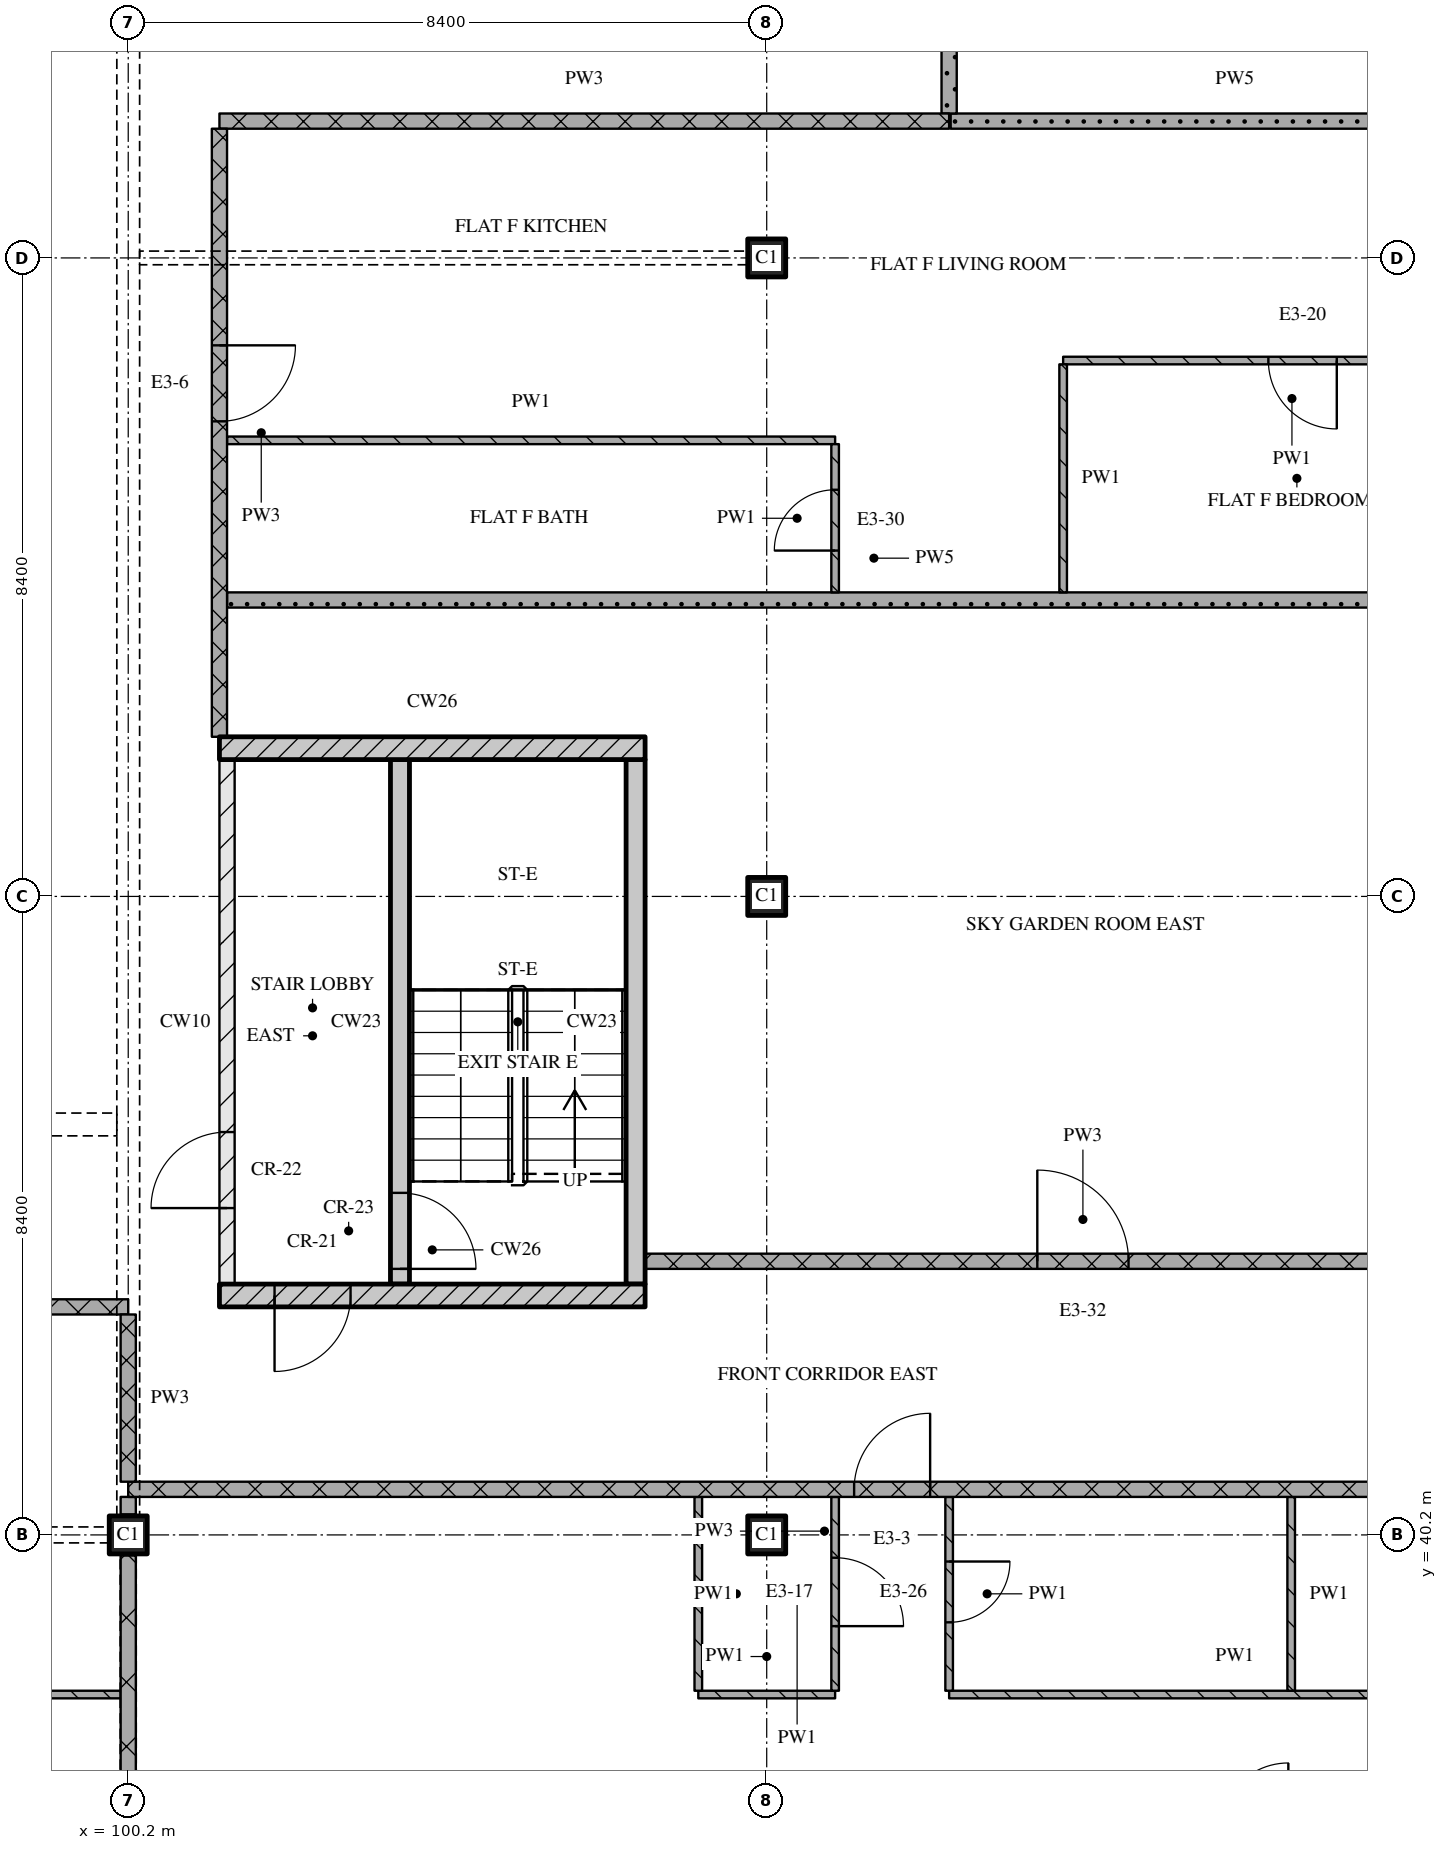
"""IFC4 building model, lengths in metres.
Left out: names, types, materials, properties, quantities, classifications, styles, units other than length and angle.
Written with IfcOpenShell. Run it as: python <this file> out.ifc"""

import sys

from ifc_helpers import new_model, si_unit, direction, frame, frame_2d, origin, origin_2d, place, context, subcontext, project, spatial, rectangle, extrude, element, fill, save


model = new_model("IFC4")
c1 = context("Model", 3, precision=1e-05, world=origin(), true_north=direction((0.0, 1.0)))
c2 = subcontext(c1, "Body", "Model", "MODEL_VIEW")
j1 = project(units=[si_unit("LENGTHUNIT", "METRE"), si_unit("PLANEANGLEUNIT", "RADIAN")], contexts=[c1])
p1 = place(None, origin())
s1 = spatial("IfcSite", under=j1, at=p1, CompositionType="ELEMENT")
p2 = place(p1, origin())
s2 = spatial("IfcBuilding", under=s1, at=p2, CompositionType="ELEMENT")
p3 = place(p2, frame((0.0, 0.0, 274.35)))
s3 = spatial("IfcBuildingStorey", under=s2, at=p3, CompositionType="ELEMENT", Elevation=274.35)
for number, where, z_axis, x_axis in (
    (1, (100.2, 40.2, 0.0), (0.0, 0.0, 1.0), (1.0, 0.0, 0.0)),
    (2, (108.6, 40.2, 0.0), (0.0, 0.0, 1.0), (1.0, 0.0, 0.0)),
    (3, (108.6, 48.6, 0.0), (0.0, 0.0, 1.0), (1.0, 0.0, 0.0)),
    (4, (108.6, 57.0, 0.0), (0.0, 0.0, 1.0), (1.0, 0.0, 0.0)),
):
    element("IfcColumn", number, at=place(p3, frame(where, z_axis=z_axis, x_axis=x_axis)), inside=s3, PredefinedType="COLUMN", context=c2, shape_type="SweptSolid", body=[
        extrude(rectangle(XDim=0.5, YDim=0.5, at=origin_2d()), origin(), (0.0, 0.0, 1.0), 3.6),
    ])
p4 = place(p3, frame((101.4, 43.35, 0.0), z_axis=(0.0, 0.0, 1.0), x_axis=(1.0, 0.0, 0.0)))
e5 = element("IfcWall", 5, at=p4, inside=s3, PredefinedType="SOLIDWALL", context=c2, shape_type="SweptSolid", body=[
    extrude(rectangle(XDim=5.6, YDim=0.3, at=frame_2d((2.8, 0.0))), origin(), (0.0, 0.0, 1.0), 3.32),
])
p5 = place(p4, frame((0.725, 0.0, 0.0)))
e6 = element("IfcOpeningElement", 6, at=p5, cuts=e5, PredefinedType="OPENING", context=c2, shape_type="SweptSolid", body=[
    extrude(rectangle(XDim=1.0, YDim=2.1, at=frame_2d((0.5, 1.05))), frame((0.0, 0.16, 0.0), z_axis=(0.0, -1.0, 0.0), x_axis=(1.0, 0.0, 0.0)), (0.0, 0.0, 1.0), 0.32),
])
p6 = place(p3, frame((101.5, 43.5, 0.0), z_axis=(0.0, 0.0, 1.0), x_axis=(0.0, 1.0, 0.0)))
e7 = element("IfcWall", 7, at=p6, inside=s3, PredefinedType="PARTITIONING", context=c2, shape_type="SweptSolid", body=[
    extrude(rectangle(XDim=6.9, YDim=0.2, at=frame_2d((3.45, 0.0))), origin(), (0.0, 0.0, 1.0), 3.32),
])
p7 = place(p6, frame((1.0, 0.0, 0.0)))
e8 = element("IfcOpeningElement", 8, at=p7, cuts=e7, PredefinedType="OPENING", context=c2, shape_type="SweptSolid", body=[
    extrude(rectangle(XDim=1.0, YDim=2.1, at=frame_2d((0.5, 1.05))), frame((0.0, 0.11, 0.0), z_axis=(0.0, -1.0, 0.0), x_axis=(1.0, 0.0, 0.0)), (0.0, 0.0, 1.0), 0.22),
])
p8 = place(p3, frame((103.775, 43.5, 0.0), z_axis=(0.0, 0.0, 1.0), x_axis=(0.0, 1.0, 0.0)))
e9 = element("IfcWall", 9, at=p8, inside=s3, PredefinedType="SOLIDWALL", context=c2, shape_type="SweptSolid", body=[
    extrude(rectangle(XDim=6.9, YDim=0.25, at=frame_2d((3.45, 0.0))), origin(), (0.0, 0.0, 1.0), 3.32),
])
p9 = place(p8, frame((0.2, 0.0, 0.0)))
e10 = element("IfcOpeningElement", 10, at=p9, cuts=e9, PredefinedType="OPENING", context=c2, shape_type="SweptSolid", body=[
    extrude(rectangle(XDim=1.0, YDim=2.1, at=frame_2d((0.5, 1.05))), frame((0.0, 0.135, 0.0), z_axis=(0.0, -1.0, 0.0), x_axis=(1.0, 0.0, 0.0)), (0.0, 0.0, 1.0), 0.27),
])
p10 = place(p3, frame((106.875, 43.5, 0.0), z_axis=(0.0, 0.0, 1.0), x_axis=(0.0, 1.0, 0.0)))
e11 = element("IfcWall", 11, at=p10, inside=s3, PredefinedType="SOLIDWALL", context=c2, shape_type="SweptSolid", body=[
    extrude(rectangle(XDim=6.9, YDim=0.25, at=frame_2d((3.45, 0.0))), origin(), (0.0, 0.0, 1.0), 3.32),
])
p11 = place(p3, frame((101.4, 50.55, 0.0), z_axis=(0.0, 0.0, 1.0), x_axis=(1.0, 0.0, 0.0)))
e12 = element("IfcWall", 12, at=p11, inside=s3, PredefinedType="SOLIDWALL", context=c2, shape_type="SweptSolid", body=[
    extrude(rectangle(XDim=5.6, YDim=0.3, at=frame_2d((2.8, 0.0))), origin(), (0.0, 0.0, 1.0), 3.32),
])
p12 = place(p3, frame((90.6, 38.1, 0.0), z_axis=(0.0, 0.0, 1.0), x_axis=(1.0, 0.0, 0.0)))
e13 = element("IfcWall", 13, at=p12, inside=s3, PredefinedType="PARTITIONING", context=c2, shape_type="SweptSolid", body=[
    extrude(rectangle(XDim=9.5, YDim=0.1, at=frame_2d((4.75, 0.0))), origin(), (0.0, 0.0, 1.0), 3.32),
])
p13 = place(p12, frame((4.35, 0.0, 0.0)))
e14 = element("IfcOpeningElement", 14, at=p13, cuts=e13, PredefinedType="OPENING", context=c2, shape_type="SweptSolid", body=[
    extrude(rectangle(XDim=0.9, YDim=2.1, at=frame_2d((0.45, 1.05))), frame((0.0, 0.06, 0.0), z_axis=(0.0, -1.0, 0.0), x_axis=(1.0, 0.0, 0.0)), (0.0, 0.0, 1.0), 0.12),
])
p14 = place(p3, frame((107.7, 38.1, 0.0), z_axis=(0.0, 0.0, 1.0), x_axis=(1.0, 0.0, 0.0)))
e15 = element("IfcWall", 15, at=p14, inside=s3, PredefinedType="PARTITIONING", context=c2, shape_type="SweptSolid", body=[
    extrude(rectangle(XDim=1.8, YDim=0.1, at=frame_2d((0.9, 0.0))), origin(), (0.0, 0.0, 1.0), 3.32),
])
p15 = place(p3, frame((111.0, 38.1, 0.0), z_axis=(0.0, 0.0, 1.0), x_axis=(1.0, 0.0, 0.0)))
e16 = element("IfcWall", 16, at=p15, inside=s3, PredefinedType="PARTITIONING", context=c2, shape_type="SweptSolid", body=[
    extrude(rectangle(XDim=7.52, YDim=0.1, at=frame_2d((3.76, 0.0))), origin(), (0.0, 0.0, 1.0), 3.32),
])
p16 = place(p15, frame((5.75, 0.0, 0.0)))
e17 = element("IfcOpeningElement", 17, at=p16, cuts=e16, PredefinedType="OPENING", context=c2, shape_type="SweptSolid", body=[
    extrude(rectangle(XDim=0.8, YDim=2.1, at=frame_2d((0.4, 1.05))), frame((0.0, 0.06, 0.0), z_axis=(0.0, -1.0, 0.0), x_axis=(1.0, 0.0, 0.0)), (0.0, 0.0, 1.0), 0.12),
])
p17 = place(p3, frame((118.52, 40.8, 0.0), z_axis=(0.0, 0.0, 1.0), x_axis=(-1.0, 0.0, 0.0)))
e18 = element("IfcWall", 18, at=p17, inside=s3, PredefinedType="PARTITIONING", context=c2, shape_type="SweptSolid", body=[
    extrude(rectangle(XDim=18.32, YDim=0.2, at=frame_2d((9.16, 0.0))), origin(), (0.0, 0.0, 1.0), 3.32),
])
p18 = place(p17, frame((7.77, 0.0, 0.0)))
e19 = element("IfcOpeningElement", 19, at=p18, cuts=e18, PredefinedType="OPENING", context=c2, shape_type="SweptSolid", body=[
    extrude(rectangle(XDim=1.0, YDim=2.1, at=frame_2d((0.5, 1.05))), frame((0.0, 0.11, 0.0), z_axis=(0.0, -1.0, 0.0), x_axis=(1.0, 0.0, 0.0)), (0.0, 0.0, 1.0), 0.22),
])
p19 = place(p3, frame((100.2, 43.2, 0.0), z_axis=(0.0, 0.0, 1.0), x_axis=(-1.0, 0.0, 0.0)))
e20 = element("IfcWall", 20, at=p19, inside=s3, PredefinedType="PARTITIONING", context=c2, shape_type="SweptSolid", body=[
    extrude(rectangle(XDim=25.2, YDim=0.2, at=frame_2d((12.6, 0.0))), origin(), (0.0, 0.0, 1.0), 3.32),
])
p20 = place(p19, frame((17.35, 0.0, 0.0)))
e21 = element("IfcOpeningElement", 21, at=p20, cuts=e20, PredefinedType="OPENING", context=c2, shape_type="SweptSolid", body=[
    extrude(rectangle(XDim=1.0, YDim=2.1, at=frame_2d((0.5, 1.05))), frame((0.0, 0.11, 0.0), z_axis=(0.0, -1.0, 0.0), x_axis=(1.0, 0.0, 0.0)), (0.0, 0.0, 1.0), 0.22),
])
p21 = place(p3, frame((107.0, 43.8, 0.0), z_axis=(0.0, 0.0, 1.0), x_axis=(1.0, 0.0, 0.0)))
e22 = element("IfcWall", 22, at=p21, inside=s3, PredefinedType="PARTITIONING", context=c2, shape_type="SweptSolid", body=[
    extrude(rectangle(XDim=11.52, YDim=0.2, at=frame_2d((5.76, 0.0))), origin(), (0.0, 0.0, 1.0), 3.32),
])
p22 = place(p21, frame((5.16, 0.0, 0.0)))
e23 = element("IfcOpeningElement", 23, at=p22, cuts=e22, PredefinedType="OPENING", context=c2, shape_type="SweptSolid", body=[
    extrude(rectangle(XDim=1.2, YDim=2.1, at=frame_2d((0.6, 1.05))), frame((0.0, 0.11, 0.0), z_axis=(0.0, -1.0, 0.0), x_axis=(1.0, 0.0, 0.0)), (0.0, 0.0, 1.0), 0.22),
])
p23 = place(p3, frame((101.5, 52.5, 0.0), z_axis=(0.0, 0.0, 1.0), x_axis=(1.0, 0.0, 0.0)))
e24 = element("IfcWall", 24, at=p23, inside=s3, PredefinedType="PARTITIONING", context=c2, shape_type="SweptSolid", body=[
    extrude(rectangle(XDim=17.02, YDim=0.2, at=frame_2d((8.51, 0.0))), origin(), (0.0, 0.0, 1.0), 3.32),
])
p24 = place(p3, frame((101.5, 54.6, 0.0), z_axis=(0.0, 0.0, 1.0), x_axis=(1.0, 0.0, 0.0)))
e25 = element("IfcWall", 25, at=p24, inside=s3, PredefinedType="PARTITIONING", context=c2, shape_type="SweptSolid", body=[
    extrude(rectangle(XDim=8.0, YDim=0.1, at=frame_2d((4.0, 0.0))), origin(), (0.0, 0.0, 1.0), 3.32),
])
p25 = place(p3, frame((118.52, 55.65, 0.0), z_axis=(0.0, 0.0, 1.0), x_axis=(-1.0, 0.0, 0.0)))
e26 = element("IfcWall", 26, at=p25, inside=s3, PredefinedType="PARTITIONING", context=c2, shape_type="SweptSolid", body=[
    extrude(rectangle(XDim=6.02, YDim=0.1, at=frame_2d((3.01, 0.0))), origin(), (0.0, 0.0, 1.0), 3.32),
])
p26 = place(p25, frame((2.42, 0.0, 0.0)))
e27 = element("IfcOpeningElement", 27, at=p26, cuts=e26, PredefinedType="OPENING", context=c2, shape_type="SweptSolid", body=[
    extrude(rectangle(XDim=0.9, YDim=2.1, at=frame_2d((0.45, 1.05))), frame((0.0, 0.06, 0.0), z_axis=(0.0, -1.0, 0.0), x_axis=(1.0, 0.0, 0.0)), (0.0, 0.0, 1.0), 0.12),
])
p27 = place(p3, frame((101.4, 58.8, 0.0), z_axis=(0.0, 0.0, 1.0), x_axis=(1.0, 0.0, 0.0)))
e28 = element("IfcWall", 28, at=p27, inside=s3, PredefinedType="PARTITIONING", context=c2, shape_type="SweptSolid", body=[
    extrude(rectangle(XDim=9.6, YDim=0.2, at=frame_2d((4.8, 0.0))), origin(), (0.0, 0.0, 1.0), 3.32),
])
p28 = place(p3, frame((111.02, 58.8, 0.0), z_axis=(0.0, 0.0, 1.0), x_axis=(1.0, 0.0, 0.0)))
e29 = element("IfcWall", 29, at=p28, inside=s3, PredefinedType="PARTITIONING", context=c2, shape_type="SweptSolid", body=[
    extrude(rectangle(XDim=7.48, YDim=0.2, at=frame_2d((3.74, 0.0))), origin(), (0.0, 0.0, 1.0), 3.32),
])
p29 = place(p3, frame((100.2, 43.1, 0.0), z_axis=(0.0, 0.0, 1.0), x_axis=(0.0, -1.0, 0.0)))
e30 = element("IfcWall", 30, at=p29, inside=s3, PredefinedType="PARTITIONING", context=c2, shape_type="SweptSolid", body=[
    extrude(rectangle(XDim=2.2, YDim=0.2, at=frame_2d((1.1, 0.0))), origin(), (0.0, 0.0, 1.0), 2.53),
])
p30 = place(p3, frame((100.2, 39.93, 0.0), z_axis=(0.0, 0.0, 1.0), x_axis=(0.0, -1.0, 0.0)))
e31 = element("IfcWall", 31, at=p30, inside=s3, PredefinedType="PARTITIONING", context=c2, shape_type="SweptSolid", body=[
    extrude(rectangle(XDim=7.86, YDim=0.2, at=frame_2d((3.93, 0.0))), origin(), (0.0, 0.0, 1.0), 2.77),
])
p31 = place(p3, frame((100.2, 40.7, 0.0), z_axis=(0.0, 0.0, 1.0), x_axis=(0.0, -1.0, 0.0)))
e32 = element("IfcWall", 32, at=p31, inside=s3, PredefinedType="PARTITIONING", context=c2, shape_type="SweptSolid", body=[
    extrude(rectangle(XDim=0.23, YDim=0.2, at=frame_2d((0.115, 0.0))), origin(), (0.0, 0.0, 1.0), 3.32),
])
p32 = place(p3, frame((101.4, 58.7, 0.0), z_axis=(0.0, 0.0, 1.0), x_axis=(0.0, -1.0, 0.0)))
e33 = element("IfcWall", 33, at=p32, inside=s3, PredefinedType="PARTITIONING", context=c2, shape_type="SweptSolid", body=[
    extrude(rectangle(XDim=8.0, YDim=0.2, at=frame_2d((4.0, 0.0))), origin(), (0.0, 0.0, 1.0), 3.32),
])
p33 = place(p32, frame((2.85, 0.0, 0.0)))
e34 = element("IfcOpeningElement", 34, at=p33, cuts=e33, PredefinedType="OPENING", context=c2, shape_type="SweptSolid", body=[
    extrude(rectangle(XDim=1.0, YDim=2.1, at=frame_2d((0.5, 1.05))), frame((0.0, 0.11, 0.0), z_axis=(0.0, -1.0, 0.0), x_axis=(1.0, 0.0, 0.0)), (0.0, 0.0, 1.0), 0.22),
])
p34 = place(p3, frame((107.7, 40.7, 0.0), z_axis=(0.0, 0.0, 1.0), x_axis=(0.0, -1.0, 0.0)))
e35 = element("IfcWall", 35, at=p34, inside=s3, PredefinedType="PARTITIONING", context=c2, shape_type="SweptSolid", body=[
    extrude(rectangle(XDim=2.55, YDim=0.1, at=frame_2d((1.275, 0.0))), origin(), (0.0, 0.0, 1.0), 3.32),
])
p35 = place(p3, frame((109.5, 38.15, 0.0), z_axis=(0.0, 0.0, 1.0), x_axis=(0.0, 1.0, 0.0)))
e36 = element("IfcWall", 36, at=p35, inside=s3, PredefinedType="PARTITIONING", context=c2, shape_type="SweptSolid", body=[
    extrude(rectangle(XDim=2.55, YDim=0.1, at=frame_2d((1.275, 0.0))), origin(), (0.0, 0.0, 1.0), 3.32),
])
p36 = place(p35, frame((0.85, 0.0, 0.0)))
e37 = element("IfcOpeningElement", 37, at=p36, cuts=e36, PredefinedType="OPENING", context=c2, shape_type="SweptSolid", body=[
    extrude(rectangle(XDim=0.9, YDim=2.1, at=frame_2d((0.45, 1.05))), frame((0.0, 0.06, 0.0), z_axis=(0.0, -1.0, 0.0), x_axis=(1.0, 0.0, 0.0)), (0.0, 0.0, 1.0), 0.12),
])
p37 = place(p3, frame((109.5, 52.6, 0.0), z_axis=(0.0, 0.0, 1.0), x_axis=(0.0, 1.0, 0.0)))
e38 = element("IfcWall", 38, at=p37, inside=s3, PredefinedType="PARTITIONING", context=c2, shape_type="SweptSolid", body=[
    extrude(rectangle(XDim=1.95, YDim=0.1, at=frame_2d((0.975, 0.0))), origin(), (0.0, 0.0, 1.0), 3.32),
])
p38 = place(p37, frame((0.55, 0.0, 0.0)))
e39 = element("IfcOpeningElement", 39, at=p38, cuts=e38, PredefinedType="OPENING", context=c2, shape_type="SweptSolid", body=[
    extrude(rectangle(XDim=0.8, YDim=2.1, at=frame_2d((0.4, 1.05))), frame((0.0, 0.06, 0.0), z_axis=(0.0, -1.0, 0.0), x_axis=(1.0, 0.0, 0.0)), (0.0, 0.0, 1.0), 0.12),
])
p39 = place(p3, frame((111.0, 61.1, 0.0), z_axis=(0.0, 0.0, 1.0), x_axis=(0.0, -1.0, 0.0)))
e40 = element("IfcWall", 40, at=p39, inside=s3, PredefinedType="PARTITIONING", context=c2, shape_type="SweptSolid", body=[
    extrude(rectangle(XDim=2.2, YDim=0.2, at=frame_2d((1.1, 0.0))), origin(), (0.0, 0.0, 1.0), 3.32),
])
p40 = place(p3, frame((111.0, 40.7, 0.0), z_axis=(0.0, 0.0, 1.0), x_axis=(0.0, -1.0, 0.0)))
e41 = element("IfcWall", 41, at=p40, inside=s3, PredefinedType="PARTITIONING", context=c2, shape_type="SweptSolid", body=[
    extrude(rectangle(XDim=2.55, YDim=0.1, at=frame_2d((1.275, 0.0))), origin(), (0.0, 0.0, 1.0), 3.32),
])
p41 = place(p40, frame((0.85, 0.0, 0.0)))
e42 = element("IfcOpeningElement", 42, at=p41, cuts=e41, PredefinedType="OPENING", context=c2, shape_type="SweptSolid", body=[
    extrude(rectangle(XDim=0.8, YDim=2.1, at=frame_2d((0.4, 1.05))), frame((0.0, 0.06, 0.0), z_axis=(0.0, -1.0, 0.0), x_axis=(1.0, 0.0, 0.0)), (0.0, 0.0, 1.0), 0.12),
])
p42 = place(p3, frame((112.5, 55.6, 0.0), z_axis=(0.0, 0.0, 1.0), x_axis=(0.0, -1.0, 0.0)))
e43 = element("IfcWall", 43, at=p42, inside=s3, PredefinedType="PARTITIONING", context=c2, shape_type="SweptSolid", body=[
    extrude(rectangle(XDim=3.0, YDim=0.1, at=frame_2d((1.5, 0.0))), origin(), (0.0, 0.0, 1.0), 3.32),
])
p43 = place(p3, frame((115.5, 40.7, 0.0), z_axis=(0.0, 0.0, 1.0), x_axis=(0.0, -1.0, 0.0)))
e44 = element("IfcWall", 44, at=p43, inside=s3, PredefinedType="PARTITIONING", context=c2, shape_type="SweptSolid", body=[
    extrude(rectangle(XDim=2.55, YDim=0.1, at=frame_2d((1.275, 0.0))), origin(), (0.0, 0.0, 1.0), 3.32),
])
p44 = place(p5, origin())
e45 = element("IfcDoor", 45, at=p44, inside=s3, OperationType="SINGLE_SWING_RIGHT", PredefinedType="DOOR", context=c2, shape_type="SweptSolid", body=[
    extrude(rectangle(XDim=1.0, YDim=2.1, at=frame_2d((0.5, 1.05))), frame((0.0, 0.025, 0.0), z_axis=(0.0, -1.0, 0.0), x_axis=(1.0, 0.0, 0.0)), (0.0, 0.0, 1.0), 0.05),
])
fill(e6, e45)
p45 = place(p9, origin())
e46 = element("IfcDoor", 46, at=p45, inside=s3, OperationType="SINGLE_SWING_RIGHT", PredefinedType="DOOR", context=c2, shape_type="SweptSolid", body=[
    extrude(rectangle(XDim=1.0, YDim=2.1, at=frame_2d((0.5, 1.05))), frame((0.0, 0.025, 0.0), z_axis=(0.0, -1.0, 0.0), x_axis=(1.0, 0.0, 0.0)), (0.0, 0.0, 1.0), 0.05),
])
fill(e10, e46)
p46 = place(p7, origin())
e47 = element("IfcDoor", 47, at=p46, inside=s3, OperationType="SINGLE_SWING_LEFT", PredefinedType="DOOR", context=c2, shape_type="SweptSolid", body=[
    extrude(rectangle(XDim=1.0, YDim=2.1, at=frame_2d((0.5, 1.05))), frame((0.0, 0.025, 0.0), z_axis=(0.0, -1.0, 0.0), x_axis=(1.0, 0.0, 0.0)), (0.0, 0.0, 1.0), 0.05),
])
fill(e8, e47)
p47 = place(p18, origin())
e48 = element("IfcDoor", 48, at=p47, inside=s3, OperationType="SINGLE_SWING_RIGHT", PredefinedType="DOOR", context=c2, shape_type="SweptSolid", body=[
    extrude(rectangle(XDim=1.0, YDim=2.1, at=frame_2d((0.5, 1.05))), frame((0.0, 0.025, 0.0), z_axis=(0.0, -1.0, 0.0), x_axis=(1.0, 0.0, 0.0)), (0.0, 0.0, 1.0), 0.05),
])
fill(e19, e48)
p48 = place(p22, origin())
e49 = element("IfcDoor", 49, at=p48, inside=s3, OperationType="SINGLE_SWING_LEFT", PredefinedType="DOOR", context=c2, shape_type="SweptSolid", body=[
    extrude(rectangle(XDim=1.2, YDim=2.1, at=frame_2d((0.6, 1.05))), frame((0.0, 0.025, 0.0), z_axis=(0.0, -1.0, 0.0), x_axis=(1.0, 0.0, 0.0)), (0.0, 0.0, 1.0), 0.05),
])
fill(e23, e49)
p49 = place(p26, origin())
e50 = element("IfcDoor", 50, at=p49, inside=s3, OperationType="SINGLE_SWING_LEFT", PredefinedType="DOOR", context=c2, shape_type="SweptSolid", body=[
    extrude(rectangle(XDim=0.9, YDim=2.1, at=frame_2d((0.45, 1.05))), frame((0.0, 0.025, 0.0), z_axis=(0.0, -1.0, 0.0), x_axis=(1.0, 0.0, 0.0)), (0.0, 0.0, 1.0), 0.05),
])
fill(e27, e50)
p50 = place(p33, origin())
e51 = element("IfcDoor", 51, at=p50, inside=s3, OperationType="SINGLE_SWING_LEFT", PredefinedType="DOOR", context=c2, shape_type="SweptSolid", body=[
    extrude(rectangle(XDim=1.0, YDim=2.1, at=frame_2d((0.5, 1.05))), frame((0.0, 0.025, 0.0), z_axis=(0.0, -1.0, 0.0), x_axis=(1.0, 0.0, 0.0)), (0.0, 0.0, 1.0), 0.05),
])
fill(e34, e51)
p51 = place(p36, origin())
e52 = element("IfcDoor", 52, at=p51, inside=s3, OperationType="SINGLE_SWING_RIGHT", PredefinedType="DOOR", context=c2, shape_type="SweptSolid", body=[
    extrude(rectangle(XDim=0.9, YDim=2.1, at=frame_2d((0.45, 1.05))), frame((0.0, 0.025, 0.0), z_axis=(0.0, -1.0, 0.0), x_axis=(1.0, 0.0, 0.0)), (0.0, 0.0, 1.0), 0.05),
])
fill(e37, e52)
p52 = place(p38, origin())
e53 = element("IfcDoor", 53, at=p52, inside=s3, OperationType="SINGLE_SWING_LEFT", PredefinedType="DOOR", context=c2, shape_type="SweptSolid", body=[
    extrude(rectangle(XDim=0.8, YDim=2.1, at=frame_2d((0.4, 1.05))), frame((0.0, 0.025, 0.0), z_axis=(0.0, -1.0, 0.0), x_axis=(1.0, 0.0, 0.0)), (0.0, 0.0, 1.0), 0.05),
])
fill(e39, e53)
p53 = place(p41, origin())
e54 = element("IfcDoor", 54, at=p53, inside=s3, OperationType="SINGLE_SWING_LEFT", PredefinedType="DOOR", context=c2, shape_type="SweptSolid", body=[
    extrude(rectangle(XDim=0.8, YDim=2.1, at=frame_2d((0.4, 1.05))), frame((0.0, 0.025, 0.0), z_axis=(0.0, -1.0, 0.0), x_axis=(1.0, 0.0, 0.0)), (0.0, 0.0, 1.0), 0.05),
])
fill(e42, e54)
save(model, sys.argv[1])
